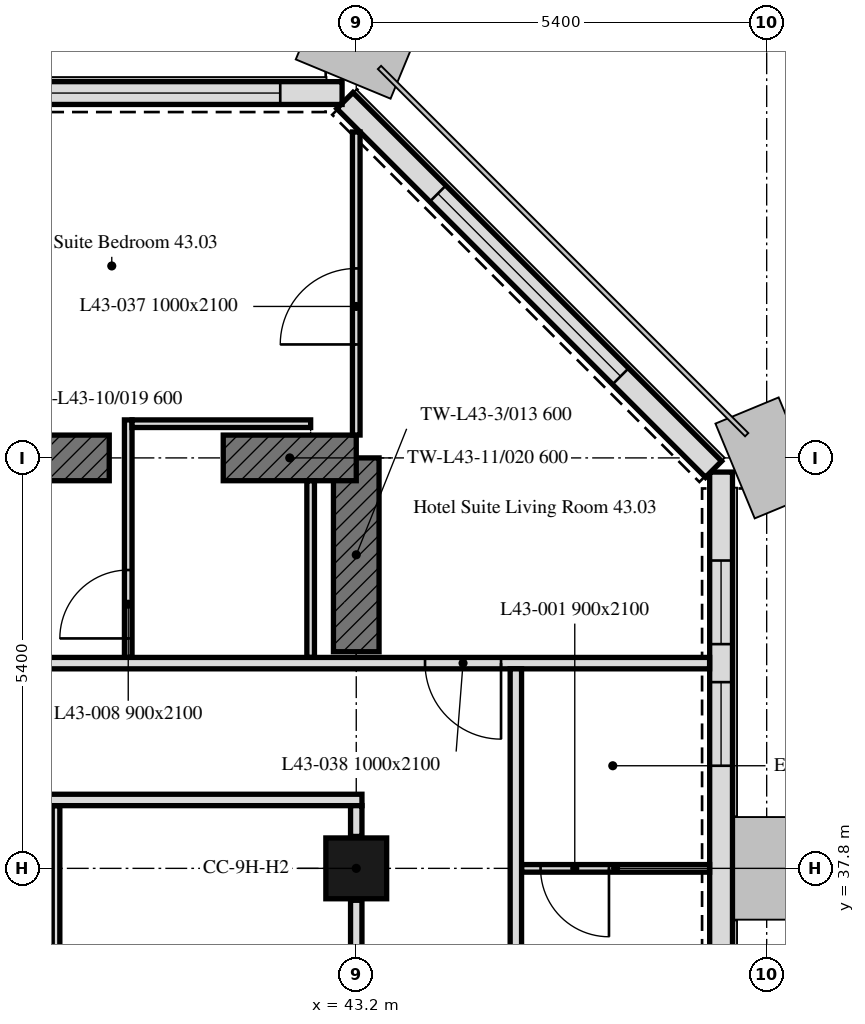
"""IFC4 building model, lengths in metres.
Left out: names, types, materials, properties, quantities, classifications, styles, units other than length and angle.
Written with IfcOpenShell. Run it as: python <this file> out.ifc"""

import sys

from ifc_helpers import new_model, si_unit, direction, frame, frame_2d, origin, origin_2d, place, context, subcontext, project, spatial, rectangle, extrude, element, fill, save


model = new_model("IFC4")
c1 = context("Model", 3, precision=1e-05, world=origin(), true_north=direction((0.0, 1.0)))
c2 = subcontext(c1, "Body", "Model", "MODEL_VIEW")
j1 = project(units=[si_unit("LENGTHUNIT", "METRE"), si_unit("PLANEANGLEUNIT", "RADIAN")], contexts=[c1])
p1 = place(None, origin())
s1 = spatial("IfcSite", under=j1, at=p1, CompositionType="ELEMENT")
p2 = place(p1, origin())
s2 = spatial("IfcBuilding", under=s1, at=p2, CompositionType="ELEMENT")
p3 = place(p2, frame((0.0, 0.0, 180.7)))
s3 = spatial("IfcBuildingStorey", under=s2, at=p3, CompositionType="ELEMENT", Elevation=180.7)
p4 = place(p3, frame((43.2, 37.8, 0.0), z_axis=(0.0, 0.0, 1.0), x_axis=(1.0, 0.0, 0.0)))
e1 = element("IfcColumn", 1, at=p4, inside=s3, PredefinedType="COLUMN", context=c2, shape_type="SweptSolid", body=[
    extrude(rectangle(XDim=0.8, YDim=0.8, at=origin_2d()), origin(), (0.0, 0.0, 1.0), 3.0),
])
p5 = place(p3, frame((43.2, 40.65, 0.0), z_axis=(0.0, 0.0, 1.0), x_axis=(0.0, 1.0, 0.0)))
e2 = element("IfcWall", 2, at=p5, inside=s3, PredefinedType="SHEAR", context=c2, shape_type="SweptSolid", body=[
    extrude(rectangle(XDim=2.55, YDim=0.6, at=frame_2d((1.275, 0.0))), origin(), (0.0, 0.0, 1.0), 3.0),
])
for number, where, z_axis, x_axis in (
    (3, (38.2, 43.2, 0.0), (0.0, 0.0, 1.0), (1.0, 0.0, 0.0)),
    (4, (41.45, 43.2, 0.0), (0.0, 0.0, 1.0), (1.0, 0.0, 0.0)),
):
    element("IfcWall", number, at=place(p3, frame(where, z_axis=z_axis, x_axis=x_axis)), inside=s3, PredefinedType="SHEAR", context=c2, shape_type="SweptSolid", body=[
        extrude(rectangle(XDim=1.75, YDim=0.6, at=frame_2d((0.875, 0.0))), origin(), (0.0, 0.0, 1.0), 3.0),
    ])
p6 = place(p3, frame((48.0, 10.986, 0.0), z_axis=(0.0, 0.0, 1.0), x_axis=(0.0, 1.0, 0.0)))
e5 = element("IfcWall", 5, at=p6, inside=s3, PredefinedType="SOLIDWALL", context=c2, shape_type="SweptSolid", body=[
    extrude(rectangle(XDim=32.027, YDim=0.3, at=frame_2d((16.014, 0.0))), origin(), (0.0, 0.0, 1.0), 3.0),
])
p7 = place(p6, frame((1.164, 0.0, 0.9)))
e6 = element("IfcOpeningElement", 6, at=p7, cuts=e5, PredefinedType="OPENING", context=c2, shape_type="SweptSolid", body=[
    extrude(rectangle(XDim=1.1, YDim=1.7, at=frame_2d((0.55, 0.85))), frame((0.0, 0.16, 0.0), z_axis=(0.0, -1.0, 0.0), x_axis=(1.0, 0.0, 0.0)), (0.0, 0.0, 1.0), 0.32),
])
p8 = place(p6, frame((2.764, 0.0, 0.9)))
e7 = element("IfcOpeningElement", 7, at=p8, cuts=e5, PredefinedType="OPENING", context=c2, shape_type="SweptSolid", body=[
    extrude(rectangle(XDim=1.1, YDim=1.7, at=frame_2d((0.55, 0.85))), frame((0.0, 0.16, 0.0), z_axis=(0.0, -1.0, 0.0), x_axis=(1.0, 0.0, 0.0)), (0.0, 0.0, 1.0), 0.32),
])
p9 = place(p6, frame((7.664, 0.0, 0.9)))
e8 = element("IfcOpeningElement", 8, at=p9, cuts=e5, PredefinedType="OPENING", context=c2, shape_type="SweptSolid", body=[
    extrude(rectangle(XDim=0.5, YDim=1.7, at=frame_2d((0.25, 0.85))), frame((0.0, 0.16, 0.0), z_axis=(0.0, -1.0, 0.0), x_axis=(1.0, 0.0, 0.0)), (0.0, 0.0, 1.0), 0.32),
])
p10 = place(p6, frame((13.064, 0.0, 0.9)))
e9 = element("IfcOpeningElement", 9, at=p10, cuts=e5, PredefinedType="OPENING", context=c2, shape_type="SweptSolid", body=[
    extrude(rectangle(XDim=0.5, YDim=1.7, at=frame_2d((0.25, 0.85))), frame((0.0, 0.16, 0.0), z_axis=(0.0, -1.0, 0.0), x_axis=(1.0, 0.0, 0.0)), (0.0, 0.0, 1.0), 0.32),
])
p11 = place(p6, frame((18.464, 0.0, 0.9)))
e10 = element("IfcOpeningElement", 10, at=p11, cuts=e5, PredefinedType="OPENING", context=c2, shape_type="SweptSolid", body=[
    extrude(rectangle(XDim=0.5, YDim=1.7, at=frame_2d((0.25, 0.85))), frame((0.0, 0.16, 0.0), z_axis=(0.0, -1.0, 0.0), x_axis=(1.0, 0.0, 0.0)), (0.0, 0.0, 1.0), 0.32),
])
p12 = place(p6, frame((23.864, 0.0, 0.9)))
e11 = element("IfcOpeningElement", 11, at=p12, cuts=e5, PredefinedType="OPENING", context=c2, shape_type="SweptSolid", body=[
    extrude(rectangle(XDim=0.5, YDim=1.7, at=frame_2d((0.25, 0.85))), frame((0.0, 0.16, 0.0), z_axis=(0.0, -1.0, 0.0), x_axis=(1.0, 0.0, 0.0)), (0.0, 0.0, 1.0), 0.32),
])
p13 = place(p6, frame((28.164, 0.0, 0.9)))
e12 = element("IfcOpeningElement", 12, at=p13, cuts=e5, PredefinedType="OPENING", context=c2, shape_type="SweptSolid", body=[
    extrude(rectangle(XDim=1.1, YDim=1.7, at=frame_2d((0.55, 0.85))), frame((0.0, 0.16, 0.0), z_axis=(0.0, -1.0, 0.0), x_axis=(1.0, 0.0, 0.0)), (0.0, 0.0, 1.0), 0.32),
])
p14 = place(p6, frame((29.764, 0.0, 0.9)))
e13 = element("IfcOpeningElement", 13, at=p14, cuts=e5, PredefinedType="OPENING", context=c2, shape_type="SweptSolid", body=[
    extrude(rectangle(XDim=1.1, YDim=1.7, at=frame_2d((0.55, 0.85))), frame((0.0, 0.16, 0.0), z_axis=(0.0, -1.0, 0.0), x_axis=(1.0, 0.0, 0.0)), (0.0, 0.0, 1.0), 0.32),
])
p15 = place(p3, frame((47.901, 43.051, 0.0), z_axis=(0.0, 0.0, 1.0), x_axis=(-0.707106781187, 0.707106781187, 0.0)))
e14 = element("IfcWall", 14, at=p15, inside=s3, PredefinedType="SOLIDWALL", context=c2, shape_type="SweptSolid", body=[
    extrude(rectangle(XDim=6.86, YDim=0.3, at=frame_2d((3.43, 0.0))), origin(), (0.0, 0.0, 1.0), 3.0),
])
p16 = place(p15, frame((1.73, 0.0, 0.9)))
e15 = element("IfcOpeningElement", 15, at=p16, cuts=e14, PredefinedType="OPENING", context=c2, shape_type="SweptSolid", body=[
    extrude(rectangle(XDim=3.4, YDim=1.7, at=frame_2d((1.7, 0.85))), frame((0.0, 0.16, 0.0), z_axis=(0.0, -1.0, 0.0), x_axis=(1.0, 0.0, 0.0)), (0.0, 0.0, 1.0), 0.32),
])
p17 = place(p3, frame((43.014, 48.0, 0.0), z_axis=(0.0, 0.0, 1.0), x_axis=(-1.0, 0.0, 0.0)))
e16 = element("IfcWall", 16, at=p17, inside=s3, PredefinedType="SOLIDWALL", context=c2, shape_type="SweptSolid", body=[
    extrude(rectangle(XDim=32.027, YDim=0.3, at=frame_2d((16.014, 0.0))), origin(), (0.0, 0.0, 1.0), 3.0),
])
p18 = place(p17, frame((0.814, 0.0, 0.9)))
e17 = element("IfcOpeningElement", 17, at=p18, cuts=e16, PredefinedType="OPENING", context=c2, shape_type="SweptSolid", body=[
    extrude(rectangle(XDim=3.4, YDim=1.7, at=frame_2d((1.7, 0.85))), frame((0.0, 0.16, 0.0), z_axis=(0.0, -1.0, 0.0), x_axis=(1.0, 0.0, 0.0)), (0.0, 0.0, 1.0), 0.32),
])
p19 = place(p17, frame((7.664, 0.0, 0.9)))
e18 = element("IfcOpeningElement", 18, at=p19, cuts=e16, PredefinedType="OPENING", context=c2, shape_type="SweptSolid", body=[
    extrude(rectangle(XDim=0.5, YDim=1.7, at=frame_2d((0.25, 0.85))), frame((0.0, 0.16, 0.0), z_axis=(0.0, -1.0, 0.0), x_axis=(1.0, 0.0, 0.0)), (0.0, 0.0, 1.0), 0.32),
])
p20 = place(p17, frame((13.064, 0.0, 0.9)))
e19 = element("IfcOpeningElement", 19, at=p20, cuts=e16, PredefinedType="OPENING", context=c2, shape_type="SweptSolid", body=[
    extrude(rectangle(XDim=0.5, YDim=1.7, at=frame_2d((0.25, 0.85))), frame((0.0, 0.16, 0.0), z_axis=(0.0, -1.0, 0.0), x_axis=(1.0, 0.0, 0.0)), (0.0, 0.0, 1.0), 0.32),
])
p21 = place(p17, frame((18.464, 0.0, 0.9)))
e20 = element("IfcOpeningElement", 20, at=p21, cuts=e16, PredefinedType="OPENING", context=c2, shape_type="SweptSolid", body=[
    extrude(rectangle(XDim=0.5, YDim=1.7, at=frame_2d((0.25, 0.85))), frame((0.0, 0.16, 0.0), z_axis=(0.0, -1.0, 0.0), x_axis=(1.0, 0.0, 0.0)), (0.0, 0.0, 1.0), 0.32),
])
p22 = place(p17, frame((23.864, 0.0, 0.9)))
e21 = element("IfcOpeningElement", 21, at=p22, cuts=e16, PredefinedType="OPENING", context=c2, shape_type="SweptSolid", body=[
    extrude(rectangle(XDim=0.5, YDim=1.7, at=frame_2d((0.25, 0.85))), frame((0.0, 0.16, 0.0), z_axis=(0.0, -1.0, 0.0), x_axis=(1.0, 0.0, 0.0)), (0.0, 0.0, 1.0), 0.32),
])
p23 = place(p17, frame((28.164, 0.0, 0.9)))
e22 = element("IfcOpeningElement", 22, at=p23, cuts=e16, PredefinedType="OPENING", context=c2, shape_type="SweptSolid", body=[
    extrude(rectangle(XDim=1.1, YDim=1.7, at=frame_2d((0.55, 0.85))), frame((0.0, 0.16, 0.0), z_axis=(0.0, -1.0, 0.0), x_axis=(1.0, 0.0, 0.0)), (0.0, 0.0, 1.0), 0.32),
])
p24 = place(p3, frame((47.849, 37.8, 0.0), z_axis=(0.0, 0.0, 1.0), x_axis=(-1.0, 0.0, 0.0)))
e23 = element("IfcWall", 23, at=p24, inside=s3, PredefinedType="PARTITIONING", context=c2, shape_type="SweptSolid", body=[
    extrude(rectangle(XDim=2.474, YDim=0.1, at=frame_2d((1.237, 0.0))), origin(), (0.0, 0.0, 1.0), 2.4),
])
p25 = place(p24, frame((1.324, 0.0, 0.0)))
e24 = element("IfcOpeningElement", 24, at=p25, cuts=e23, PredefinedType="OPENING", context=c2, shape_type="SweptSolid", body=[
    extrude(rectangle(XDim=0.9, YDim=2.1, at=frame_2d((0.45, 1.05))), frame((0.0, 0.05, 0.0), z_axis=(0.0, -1.0, 0.0), x_axis=(1.0, 0.0, 0.0)), (0.0, 0.0, 1.0), 0.1),
])
p26 = place(p3, frame((43.2, 43.501, 0.0), z_axis=(0.0, 0.0, 1.0), x_axis=(0.0, 1.0, 0.0)))
e25 = element("IfcWall", 25, at=p26, inside=s3, PredefinedType="PARTITIONING", context=c2, shape_type="SweptSolid", body=[
    extrude(rectangle(XDim=3.987, YDim=0.1, at=frame_2d((1.993, 0.0))), origin(), (0.0, 0.0, 1.0), 3.0),
])
p27 = place(p26, frame((1.192, 0.0, 0.0)))
e26 = element("IfcOpeningElement", 26, at=p27, cuts=e25, PredefinedType="OPENING", context=c2, shape_type="SweptSolid", body=[
    extrude(rectangle(XDim=1.0, YDim=2.1, at=frame_2d((0.5, 1.05))), frame((0.0, 0.05, 0.0), z_axis=(0.0, -1.0, 0.0), x_axis=(1.0, 0.0, 0.0)), (0.0, 0.0, 1.0), 0.1),
])
p28 = place(p3, frame((40.2, 40.575, 0.0), z_axis=(0.0, 0.0, 1.0), x_axis=(0.0, 1.0, 0.0)))
e27 = element("IfcWall", 27, at=p28, inside=s3, PredefinedType="PARTITIONING", context=c2, shape_type="SweptSolid", body=[
    extrude(rectangle(XDim=3.125, YDim=0.1, at=frame_2d((1.562, 0.0))), origin(), (0.0, 0.0, 1.0), 3.0),
])
p29 = place(p28, frame((0.25, 0.0, 0.0)))
e28 = element("IfcOpeningElement", 28, at=p29, cuts=e27, PredefinedType="OPENING", context=c2, shape_type="SweptSolid", body=[
    extrude(rectangle(XDim=0.9, YDim=2.1, at=frame_2d((0.45, 1.05))), frame((0.0, 0.05, 0.0), z_axis=(0.0, -1.0, 0.0), x_axis=(1.0, 0.0, 0.0)), (0.0, 0.0, 1.0), 0.1),
])
p30 = place(p3, frame((40.25, 43.65, 0.0), z_axis=(0.0, 0.0, 1.0), x_axis=(1.0, 0.0, 0.0)))
e29 = element("IfcWall", 29, at=p30, inside=s3, PredefinedType="PARTITIONING", context=c2, shape_type="SweptSolid", body=[
    extrude(rectangle(XDim=2.35, YDim=0.1, at=frame_2d((1.175, 0.0))), origin(), (0.0, 0.0, 1.0), 3.0),
])
p31 = place(p3, frame((42.6, 42.899, 0.0), z_axis=(0.0, 0.0, 1.0), x_axis=(0.0, -1.0, 0.0)))
e30 = element("IfcWall", 30, at=p31, inside=s3, PredefinedType="PARTITIONING", context=c2, shape_type="SweptSolid", body=[
    extrude(rectangle(XDim=2.324, YDim=0.1, at=frame_2d((1.162, 0.0))), origin(), (0.0, 0.0, 1.0), 3.0),
])
p32 = place(p3, frame((47.849, 40.5, 0.0), z_axis=(0.0, 0.0, 1.0), x_axis=(-1.0, 0.0, 0.0)))
e31 = element("IfcWall", 31, at=p32, inside=s3, PredefinedType="PARTITIONING", context=c2, shape_type="SweptSolid", body=[
    extrude(rectangle(XDim=41.698, YDim=0.15, at=frame_2d((20.849, 0.0))), origin(), (0.0, 0.0, 1.0), 2.4),
])
p33 = place(p32, frame((37.899, 0.0, 0.0)))
e32 = element("IfcOpeningElement", 32, at=p33, cuts=e31, PredefinedType="OPENING", context=c2, shape_type="SweptSolid", body=[
    extrude(rectangle(XDim=1.0, YDim=2.1, at=frame_2d((0.5, 1.05))), frame((0.0, 0.075, 0.0), z_axis=(0.0, -1.0, 0.0), x_axis=(1.0, 0.0, 0.0)), (0.0, 0.0, 1.0), 0.15),
])
p34 = place(p32, frame((32.499, 0.0, 0.0)))
e33 = element("IfcOpeningElement", 33, at=p34, cuts=e31, PredefinedType="OPENING", context=c2, shape_type="SweptSolid", body=[
    extrude(rectangle(XDim=1.0, YDim=2.1, at=frame_2d((0.5, 1.05))), frame((0.0, 0.075, 0.0), z_axis=(0.0, -1.0, 0.0), x_axis=(1.0, 0.0, 0.0)), (0.0, 0.0, 1.0), 0.15),
])
p35 = place(p32, frame((27.099, 0.0, 0.0)))
e34 = element("IfcOpeningElement", 34, at=p35, cuts=e31, PredefinedType="OPENING", context=c2, shape_type="SweptSolid", body=[
    extrude(rectangle(XDim=1.0, YDim=2.1, at=frame_2d((0.5, 1.05))), frame((0.0, 0.075, 0.0), z_axis=(0.0, -1.0, 0.0), x_axis=(1.0, 0.0, 0.0)), (0.0, 0.0, 1.0), 0.15),
])
p36 = place(p32, frame((21.699, 0.0, 0.0)))
e35 = element("IfcOpeningElement", 35, at=p36, cuts=e31, PredefinedType="OPENING", context=c2, shape_type="SweptSolid", body=[
    extrude(rectangle(XDim=1.0, YDim=2.1, at=frame_2d((0.5, 1.05))), frame((0.0, 0.075, 0.0), z_axis=(0.0, -1.0, 0.0), x_axis=(1.0, 0.0, 0.0)), (0.0, 0.0, 1.0), 0.15),
])
p37 = place(p32, frame((16.299, 0.0, 0.0)))
e36 = element("IfcOpeningElement", 36, at=p37, cuts=e31, PredefinedType="OPENING", context=c2, shape_type="SweptSolid", body=[
    extrude(rectangle(XDim=1.0, YDim=2.1, at=frame_2d((0.5, 1.05))), frame((0.0, 0.075, 0.0), z_axis=(0.0, -1.0, 0.0), x_axis=(1.0, 0.0, 0.0)), (0.0, 0.0, 1.0), 0.15),
])
p38 = place(p32, frame((10.899, 0.0, 0.0)))
e37 = element("IfcOpeningElement", 37, at=p38, cuts=e31, PredefinedType="OPENING", context=c2, shape_type="SweptSolid", body=[
    extrude(rectangle(XDim=1.0, YDim=2.1, at=frame_2d((0.5, 1.05))), frame((0.0, 0.075, 0.0), z_axis=(0.0, -1.0, 0.0), x_axis=(1.0, 0.0, 0.0)), (0.0, 0.0, 1.0), 0.15),
])
p39 = place(p32, frame((2.744, 0.0, 0.0)))
e38 = element("IfcOpeningElement", 38, at=p39, cuts=e31, PredefinedType="OPENING", context=c2, shape_type="SweptSolid", body=[
    extrude(rectangle(XDim=1.0, YDim=2.1, at=frame_2d((0.5, 1.05))), frame((0.0, 0.075, 0.0), z_axis=(0.0, -1.0, 0.0), x_axis=(1.0, 0.0, 0.0)), (0.0, 0.0, 1.0), 0.15),
])
p40 = place(p3, frame((45.3, 40.425, 0.0), z_axis=(0.0, 0.0, 1.0), x_axis=(0.0, -1.0, 0.0)))
e39 = element("IfcWall", 39, at=p40, inside=s3, PredefinedType="PARTITIONING", context=c2, shape_type="SweptSolid", body=[
    extrude(rectangle(XDim=13.35, YDim=0.15, at=frame_2d((6.675, 0.0))), origin(), (0.0, 0.0, 1.0), 2.4),
])
p41 = place(p40, frame((10.225, 0.0, 0.0)))
e40 = element("IfcOpeningElement", 40, at=p41, cuts=e39, PredefinedType="OPENING", context=c2, shape_type="SweptSolid", body=[
    extrude(rectangle(XDim=1.0, YDim=2.1, at=frame_2d((0.5, 1.05))), frame((0.0, 0.075, 0.0), z_axis=(0.0, -1.0, 0.0), x_axis=(1.0, 0.0, 0.0)), (0.0, 0.0, 1.0), 0.15),
])
p42 = place(p40, frame((4.825, 0.0, 0.0)))
e41 = element("IfcOpeningElement", 41, at=p42, cuts=e39, PredefinedType="OPENING", context=c2, shape_type="SweptSolid", body=[
    extrude(rectangle(XDim=1.0, YDim=2.1, at=frame_2d((0.5, 1.05))), frame((0.0, 0.075, 0.0), z_axis=(0.0, -1.0, 0.0), x_axis=(1.0, 0.0, 0.0)), (0.0, 0.0, 1.0), 0.15),
])
p43 = place(p3, frame((39.25, 32.4, 0.0), z_axis=(0.0, 0.0, 1.0), x_axis=(0.0, 1.0, 0.0)))
e42 = element("IfcWall", 42, at=p43, inside=s3, PredefinedType="PARTITIONING", context=c2, shape_type="SweptSolid", body=[
    extrude(rectangle(XDim=6.225, YDim=0.1, at=frame_2d((3.113, 0.0))), origin(), (0.0, 0.0, 1.0), 2.4),
])
p44 = place(p3, frame((43.275, 38.7, 0.0), z_axis=(0.0, 0.0, 1.0), x_axis=(-1.0, 0.0, 0.0)))
e43 = element("IfcWall", 43, at=p44, inside=s3, PredefinedType="PARTITIONING", context=c2, shape_type="SweptSolid", body=[
    extrude(rectangle(XDim=37.124, YDim=0.15, at=frame_2d((18.562, 0.0))), origin(), (0.0, 0.0, 1.0), 2.4),
])
p45 = place(p44, frame((18.475, 0.0, 0.0)))
e44 = element("IfcOpeningElement", 44, at=p45, cuts=e43, PredefinedType="OPENING", context=c2, shape_type="SweptSolid", body=[
    extrude(rectangle(XDim=1.0, YDim=2.1, at=frame_2d((0.5, 1.05))), frame((0.0, 0.075, 0.0), z_axis=(0.0, -1.0, 0.0), x_axis=(1.0, 0.0, 0.0)), (0.0, 0.0, 1.0), 0.15),
])
p46 = place(p44, frame((34.715, 0.0, 0.0)))
e45 = element("IfcOpeningElement", 45, at=p46, cuts=e43, PredefinedType="OPENING", context=c2, shape_type="SweptSolid", body=[
    extrude(rectangle(XDim=1.0, YDim=2.1, at=frame_2d((0.5, 1.05))), frame((0.0, 0.075, 0.0), z_axis=(0.0, -1.0, 0.0), x_axis=(1.0, 0.0, 0.0)), (0.0, 0.0, 1.0), 0.15),
])
p47 = place(p44, frame((7.925, 0.0, 0.0)))
e46 = element("IfcOpeningElement", 46, at=p47, cuts=e43, PredefinedType="OPENING", context=c2, shape_type="SweptSolid", body=[
    extrude(rectangle(XDim=1.0, YDim=2.1, at=frame_2d((0.5, 1.05))), frame((0.0, 0.075, 0.0), z_axis=(0.0, -1.0, 0.0), x_axis=(1.0, 0.0, 0.0)), (0.0, 0.0, 1.0), 0.15),
])
p48 = place(p44, frame((29.025, 0.0, 0.0)))
e47 = element("IfcOpeningElement", 47, at=p48, cuts=e43, PredefinedType="OPENING", context=c2, shape_type="SweptSolid", body=[
    extrude(rectangle(XDim=1.0, YDim=2.1, at=frame_2d((0.5, 1.05))), frame((0.0, 0.075, 0.0), z_axis=(0.0, -1.0, 0.0), x_axis=(1.0, 0.0, 0.0)), (0.0, 0.0, 1.0), 0.15),
])
p49 = place(p44, frame((30.495, 0.0, 0.0)))
e48 = element("IfcOpeningElement", 48, at=p49, cuts=e43, PredefinedType="OPENING", context=c2, shape_type="SweptSolid", body=[
    extrude(rectangle(XDim=1.0, YDim=2.1, at=frame_2d((0.5, 1.05))), frame((0.0, 0.075, 0.0), z_axis=(0.0, -1.0, 0.0), x_axis=(1.0, 0.0, 0.0)), (0.0, 0.0, 1.0), 0.15),
])
p50 = place(p44, frame((6.455, 0.0, 0.0)))
e49 = element("IfcOpeningElement", 49, at=p50, cuts=e43, PredefinedType="OPENING", context=c2, shape_type="SweptSolid", body=[
    extrude(rectangle(XDim=1.0, YDim=2.1, at=frame_2d((0.5, 1.05))), frame((0.0, 0.075, 0.0), z_axis=(0.0, -1.0, 0.0), x_axis=(1.0, 0.0, 0.0)), (0.0, 0.0, 1.0), 0.15),
])
p51 = place(p3, frame((43.2, 38.625, 0.0), z_axis=(0.0, 0.0, 1.0), x_axis=(0.0, -1.0, 0.0)))
e50 = element("IfcWall", 50, at=p51, inside=s3, PredefinedType="PARTITIONING", context=c2, shape_type="SweptSolid", body=[
    extrude(rectangle(XDim=0.405, YDim=0.15, at=frame_2d((0.203, 0.0))), origin(), (0.0, 0.0, 1.0), 3.0),
])
p52 = place(p3, frame((43.2, 37.38, 0.0), z_axis=(0.0, 0.0, 1.0), x_axis=(0.0, -1.0, 0.0)))
e51 = element("IfcWall", 51, at=p52, inside=s3, PredefinedType="PARTITIONING", context=c2, shape_type="SweptSolid", body=[
    extrude(rectangle(XDim=4.98, YDim=0.15, at=frame_2d((2.49, 0.0))), origin(), (0.0, 0.0, 1.0), 3.0),
])
p53 = place(p52, frame((2.113, 0.0, 0.0)))
e52 = element("IfcOpeningElement", 52, at=p53, cuts=e51, PredefinedType="OPENING", context=c2, shape_type="SweptSolid", body=[
    extrude(rectangle(XDim=1.0, YDim=2.1, at=frame_2d((0.5, 1.05))), frame((0.0, 0.075, 0.0), z_axis=(0.0, -1.0, 0.0), x_axis=(1.0, 0.0, 0.0)), (0.0, 0.0, 1.0), 0.15),
])
p54 = place(p13, origin())
e53 = element("IfcWindow", 53, at=p54, inside=s3, PartitioningType="SINGLE_PANEL", PredefinedType="WINDOW", context=c2, shape_type="SweptSolid", body=[
    extrude(rectangle(XDim=1.1, YDim=1.7, at=frame_2d((0.55, 0.85))), frame((0.0, 0.03, 0.0), z_axis=(0.0, -1.0, 0.0), x_axis=(1.0, 0.0, 0.0)), (0.0, 0.0, 1.0), 0.06),
])
fill(e12, e53)
p55 = place(p14, origin())
e54 = element("IfcWindow", 54, at=p55, inside=s3, PartitioningType="SINGLE_PANEL", PredefinedType="WINDOW", context=c2, shape_type="SweptSolid", body=[
    extrude(rectangle(XDim=1.1, YDim=1.7, at=frame_2d((0.55, 0.85))), frame((0.0, 0.03, 0.0), z_axis=(0.0, -1.0, 0.0), x_axis=(1.0, 0.0, 0.0)), (0.0, 0.0, 1.0), 0.06),
])
fill(e13, e54)
p56 = place(p16, origin())
e55 = element("IfcWindow", 55, at=p56, inside=s3, PartitioningType="SINGLE_PANEL", PredefinedType="WINDOW", context=c2, shape_type="SweptSolid", body=[
    extrude(rectangle(XDim=3.4, YDim=1.7, at=frame_2d((1.7, 0.85))), frame((0.0, 0.03, 0.0), z_axis=(0.0, -1.0, 0.0), x_axis=(1.0, 0.0, 0.0)), (0.0, 0.0, 1.0), 0.06),
])
fill(e15, e55)
p57 = place(p18, origin())
e56 = element("IfcWindow", 56, at=p57, inside=s3, PartitioningType="SINGLE_PANEL", PredefinedType="WINDOW", context=c2, shape_type="SweptSolid", body=[
    extrude(rectangle(XDim=3.4, YDim=1.7, at=frame_2d((1.7, 0.85))), frame((0.0, 0.03, 0.0), z_axis=(0.0, -1.0, 0.0), x_axis=(1.0, 0.0, 0.0)), (0.0, 0.0, 1.0), 0.06),
])
fill(e17, e56)
p58 = place(p25, origin())
e57 = element("IfcDoor", 57, at=p58, inside=s3, OperationType="SINGLE_SWING_LEFT", PredefinedType="DOOR", context=c2, shape_type="SweptSolid", body=[
    extrude(rectangle(XDim=0.9, YDim=2.1, at=frame_2d((0.45, 1.05))), frame((0.0, 0.025, 0.0), z_axis=(0.0, -1.0, 0.0), x_axis=(1.0, 0.0, 0.0)), (0.0, 0.0, 1.0), 0.05),
])
fill(e24, e57)
p59 = place(p29, origin())
e58 = element("IfcDoor", 58, at=p59, inside=s3, OperationType="SINGLE_SWING_RIGHT", PredefinedType="DOOR", context=c2, shape_type="SweptSolid", body=[
    extrude(rectangle(XDim=0.9, YDim=2.1, at=frame_2d((0.45, 1.05))), frame((0.0, 0.025, 0.0), z_axis=(0.0, -1.0, 0.0), x_axis=(1.0, 0.0, 0.0)), (0.0, 0.0, 1.0), 0.05),
])
fill(e28, e58)
p60 = place(p27, origin())
e59 = element("IfcDoor", 59, at=p60, inside=s3, OperationType="SINGLE_SWING_RIGHT", PredefinedType="DOOR", context=c2, shape_type="SweptSolid", body=[
    extrude(rectangle(XDim=1.0, YDim=2.1, at=frame_2d((0.5, 1.05))), frame((0.0, 0.025, 0.0), z_axis=(0.0, -1.0, 0.0), x_axis=(1.0, 0.0, 0.0)), (0.0, 0.0, 1.0), 0.05),
])
fill(e26, e59)
p61 = place(p39, origin())
e60 = element("IfcDoor", 60, at=p61, inside=s3, OperationType="SINGLE_SWING_LEFT", PredefinedType="DOOR", context=c2, shape_type="SweptSolid", body=[
    extrude(rectangle(XDim=1.0, YDim=2.1, at=frame_2d((0.5, 1.05))), frame((0.0, 0.025, 0.0), z_axis=(0.0, -1.0, 0.0), x_axis=(1.0, 0.0, 0.0)), (0.0, 0.0, 1.0), 0.05),
])
fill(e38, e60)
save(model, sys.argv[1])
